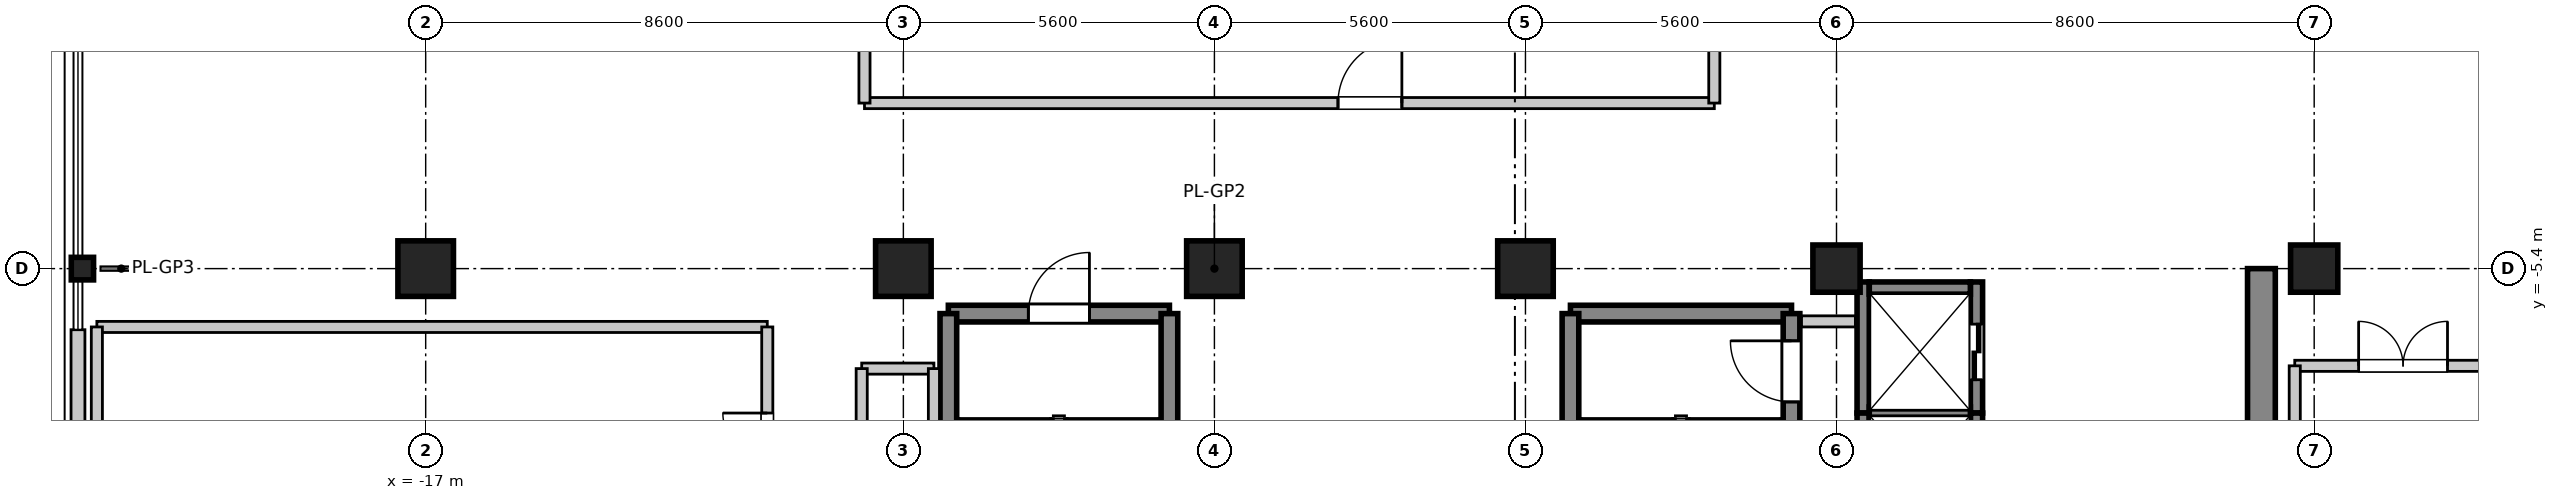
"""IFC4 building model, lengths in metres.
Left out: names, types, materials, properties, quantities, classifications, styles, units other than length and angle.
Written with IfcOpenShell. Run it as: python <this file> out.ifc"""

import sys

from ifc_helpers import new_model, si_unit, direction, frame, frame_2d, origin, origin_2d, place, context, subcontext, project, spatial, rectangle, i_section, extrude, source, transform, mapped, element, fill, save


model = new_model("IFC4")
c1 = context("Model", 3, precision=1e-05, world=origin(), true_north=direction((0.0, 1.0)))
c2 = subcontext(c1, "Body", "Model", "MODEL_VIEW")
j1 = project(units=[si_unit("LENGTHUNIT", "METRE"), si_unit("PLANEANGLEUNIT", "RADIAN")], contexts=[c1])
p1 = place(None, origin())
s1 = spatial("IfcSite", under=j1, at=p1, CompositionType="ELEMENT")
p2 = place(p1, origin())
s2 = spatial("IfcBuilding", under=s1, at=p2, CompositionType="ELEMENT")
p3 = place(p2, frame((0.0, 0.0, 261.5)))
s3 = spatial("IfcBuildingStorey", under=s2, at=p3, CompositionType="ELEMENT", Elevation=261.5)
m1 = source(origin(), c2, "Body", "SweptSolid", [
    extrude(rectangle(XDim=1.0, YDim=1.0, at=origin_2d()), origin(), (0.0, 0.0, 1.0), 4.755),
])
for number, where, z_axis, x_axis in (
    (1, (-17.0, -5.4, 0.0), (0.0, 0.0, 1.0), (1.0, 0.0, 0.0)),
    (2, (-8.4, -5.4, 0.0), (0.0, 0.0, 1.0), (1.0, 0.0, 0.0)),
    (3, (-2.8, -5.4, 0.0), (0.0, 0.0, 1.0), (1.0, 0.0, 0.0)),
    (4, (2.8, -5.4, 0.0), (0.0, 0.0, 1.0), (1.0, 0.0, 0.0)),
):
    element("IfcColumn", number, at=place(p3, frame(where, z_axis=z_axis, x_axis=x_axis)), inside=s3, PredefinedType="COLUMN", context=c2, shape_type="MappedRepresentation", body=[
        mapped(m1, transform((0.0, 0.0, 0.0), scale=1.0)),
    ])
m2 = source(origin(), c2, "Body", "SweptSolid", [
    extrude(rectangle(XDim=0.85, YDim=0.85, at=origin_2d()), origin(), (0.0, 0.0, 1.0), 4.755),
])
for number, where, z_axis, x_axis in (
    (5, (8.4, -5.4, 0.0), (0.0, 0.0, 1.0), (1.0, 0.0, 0.0)),
    (6, (17.0, -5.4, 0.0), (0.0, 0.0, 1.0), (1.0, 0.0, 0.0)),
):
    element("IfcColumn", number, at=place(p3, frame(where, z_axis=z_axis, x_axis=x_axis)), inside=s3, PredefinedType="PILASTER", context=c2, shape_type="MappedRepresentation", body=[
        mapped(m2, transform((0.0, 0.0, 0.0), scale=1.0)),
    ])
m3 = source(origin(), c2, "Body", "SweptSolid", [
    extrude(i_section(OverallWidth=0.401, OverallDepth=0.406, WebThickness=0.016, FlangeThickness=0.025, at=origin_2d()), origin(), (0.0, 0.0, 1.0), 4.707),
])
p4 = place(p3, frame((-23.18, -5.4, 0.0), z_axis=(0.148692963872, 0.0, 0.988883411983), x_axis=(0.0, 1.0, 0.0)))
e7 = element("IfcColumn", 7, at=p4, inside=s3, PredefinedType="COLUMN", context=c2, shape_type="MappedRepresentation", body=[
    mapped(m3, transform((0.0, 0.0, 0.0), scale=1.0)),
])
m4 = source(origin(), c2, "Body", "SweptSolid", [
    extrude(rectangle(XDim=11.6, YDim=0.5, at=frame_2d((5.8, 0.0))), origin(), (0.0, 0.0, 1.0), 4.5),
])
p5 = place(p3, frame((16.05, -17.0, 0.0), z_axis=(0.0, 0.0, 1.0), x_axis=(0.0, 1.0, 0.0)))
e8 = element("IfcWall", 8, at=p5, inside=s3, PredefinedType="SHEAR", context=c2, shape_type="MappedRepresentation", body=[
    mapped(m4, transform((0.0, 0.0, 0.0), scale=1.0)),
])
m5 = source(origin(), c2, "Body", "SweptSolid", [
    extrude(rectangle(XDim=3.98, YDim=0.3, at=frame_2d((1.99, 0.0))), origin(), (0.0, 0.0, 1.0), 4.5),
])
p6 = place(p3, frame((3.61, -6.21, 0.0), z_axis=(0.0, 0.0, 1.0), x_axis=(1.0, 0.0, 0.0)))
e9 = element("IfcWall", 9, at=p6, inside=s3, PredefinedType="SHEAR", context=c2, shape_type="MappedRepresentation", body=[
    mapped(m5, transform((0.0, 0.0, 0.0), scale=1.0)),
])
m6 = source(origin(), c2, "Body", "SweptSolid", [
    extrude(rectangle(XDim=9.38, YDim=0.3, at=frame_2d((4.69, 0.0))), origin(), (0.0, 0.0, 1.0), 4.5),
])
p7 = place(p3, frame((3.61, -15.59, 0.0), z_axis=(0.0, 0.0, 1.0), x_axis=(0.0, 1.0, 0.0)))
e10 = element("IfcWall", 10, at=p7, inside=s3, PredefinedType="SHEAR", context=c2, shape_type="MappedRepresentation", body=[
    mapped(m6, transform((0.0, 0.0, 0.0), scale=1.0)),
])
p8 = place(p3, frame((7.59, -15.59, 0.0), z_axis=(0.0, 0.0, 1.0), x_axis=(0.0, 1.0, 0.0)))
e11 = element("IfcWall", 11, at=p8, inside=s3, PredefinedType="SHEAR", context=c2, shape_type="MappedRepresentation", body=[
    mapped(m6, transform((0.0, 0.0, 0.0), scale=1.0)),
])
p9 = place(p8, frame((7.79, 0.0, 0.0)))
e12 = element("IfcOpeningElement", 12, at=p9, cuts=e11, PredefinedType="OPENING", context=c2, shape_type="SweptSolid", body=[
    extrude(rectangle(XDim=1.1, YDim=2.15, at=frame_2d((0.55, 1.075))), frame((0.0, 0.16, 0.0), z_axis=(0.0, -1.0, 0.0), x_axis=(1.0, 0.0, 0.0)), (0.0, 0.0, 1.0), 0.32),
])
p10 = place(p3, frame((-7.59, -6.21, 0.0), z_axis=(0.0, 0.0, 1.0), x_axis=(1.0, 0.0, 0.0)))
e13 = element("IfcWall", 13, at=p10, inside=s3, PredefinedType="SHEAR", context=c2, shape_type="MappedRepresentation", body=[
    mapped(m5, transform((0.0, 0.0, 0.0), scale=1.0)),
])
p11 = place(p10, frame((1.44, 0.0, 0.0)))
e14 = element("IfcOpeningElement", 14, at=p11, cuts=e13, PredefinedType="OPENING", context=c2, shape_type="SweptSolid", body=[
    extrude(rectangle(XDim=1.1, YDim=2.15, at=frame_2d((0.55, 1.075))), frame((0.0, 0.16, 0.0), z_axis=(0.0, -1.0, 0.0), x_axis=(1.0, 0.0, 0.0)), (0.0, 0.0, 1.0), 0.32),
])
for number, where, z_axis, x_axis in (
    (15, (-7.59, -15.59, 0.0), (0.0, 0.0, 1.0), (0.0, 1.0, 0.0)),
    (16, (-3.61, -15.59, 0.0), (0.0, 0.0, 1.0), (0.0, 1.0, 0.0)),
):
    element("IfcWall", number, at=place(p3, frame(where, z_axis=z_axis, x_axis=x_axis)), inside=s3, PredefinedType="SHEAR", context=c2, shape_type="MappedRepresentation", body=[
        mapped(m6, transform((0.0, 0.0, 0.0), scale=1.0)),
    ])
m7 = source(origin(), c2, "Body", "SweptSolid", [
    extrude(rectangle(XDim=2.36, YDim=0.22, at=frame_2d((1.18, 0.0))), origin(), (0.0, 0.0, 1.0), 4.5),
])
p12 = place(p3, frame((8.88, -8.0, 0.0), z_axis=(0.0, 0.0, 1.0), x_axis=(0.0, 1.0, 0.0)))
e17 = element("IfcWall", 17, at=p12, inside=s3, PredefinedType="SHEAR", context=c2, shape_type="MappedRepresentation", body=[
    mapped(m7, transform((0.0, 0.0, 0.0), scale=1.0)),
])
p13 = place(p3, frame((10.92, -8.0, 0.0), z_axis=(0.0, 0.0, 1.0), x_axis=(0.0, 1.0, 0.0)))
e18 = element("IfcWall", 18, at=p13, inside=s3, PredefinedType="SHEAR", context=c2, shape_type="MappedRepresentation", body=[
    mapped(m7, transform((0.0, 0.0, 0.0), scale=1.0)),
])
p14 = place(p13, frame((0.6, 0.0, 0.0)))
e19 = element("IfcOpeningElement", 19, at=p14, cuts=e18, PredefinedType="OPENING", context=c2, shape_type="SweptSolid", body=[
    extrude(rectangle(XDim=1.0, YDim=2.2, at=frame_2d((0.5, 1.1))), frame((0.0, 0.12, 0.0), z_axis=(0.0, -1.0, 0.0), x_axis=(1.0, 0.0, 0.0)), (0.0, 0.0, 1.0), 0.24),
])
m8 = source(origin(), c2, "Body", "SweptSolid", [
    extrude(rectangle(XDim=1.82, YDim=0.22, at=frame_2d((0.91, 0.0))), origin(), (0.0, 0.0, 1.0), 4.5),
])
p15 = place(p3, frame((8.99, -5.75, 0.0), z_axis=(0.0, 0.0, 1.0), x_axis=(1.0, 0.0, 0.0)))
e20 = element("IfcWall", 20, at=p15, inside=s3, PredefinedType="SHEAR", context=c2, shape_type="MappedRepresentation", body=[
    mapped(m8, transform((0.0, 0.0, 0.0), scale=1.0)),
])
m9 = source(origin(), c2, "Body", "SweptSolid", [
    extrude(rectangle(XDim=2.2, YDim=0.22, at=frame_2d((1.1, 0.0))), origin(), (0.0, 0.0, 1.0), 4.5),
])
p16 = place(p3, frame((8.88, -10.2, 0.0), z_axis=(0.0, 0.0, 1.0), x_axis=(0.0, 1.0, 0.0)))
e21 = element("IfcWall", 21, at=p16, inside=s3, PredefinedType="SHEAR", context=c2, shape_type="MappedRepresentation", body=[
    mapped(m9, transform((0.0, 0.0, 0.0), scale=1.0)),
])
p17 = place(p3, frame((10.92, -10.2, 0.0), z_axis=(0.0, 0.0, 1.0), x_axis=(0.0, 1.0, 0.0)))
e22 = element("IfcWall", 22, at=p17, inside=s3, PredefinedType="SHEAR", context=c2, shape_type="MappedRepresentation", body=[
    mapped(m9, transform((0.0, 0.0, 0.0), scale=1.0)),
])
p18 = place(p17, frame((0.6, 0.0, 0.0)))
e23 = element("IfcOpeningElement", 23, at=p18, cuts=e22, PredefinedType="OPENING", context=c2, shape_type="SweptSolid", body=[
    extrude(rectangle(XDim=1.0, YDim=2.2, at=frame_2d((0.5, 1.1))), frame((0.0, 0.12, 0.0), z_axis=(0.0, -1.0, 0.0), x_axis=(1.0, 0.0, 0.0)), (0.0, 0.0, 1.0), 0.24),
])
m10 = source(origin(), c2, "Body", "SweptSolid", [
    extrude(rectangle(XDim=1.82, YDim=0.22, at=frame_2d((0.91, 0.0))), origin(), (0.0, 0.0, 1.0), 4.8),
])
p19 = place(p3, frame((8.99, -8.0, 0.0), z_axis=(0.0, 0.0, 1.0), x_axis=(1.0, 0.0, 0.0)))
e24 = element("IfcWall", 24, at=p19, inside=s3, PredefinedType="SHEAR", context=c2, shape_type="MappedRepresentation", body=[
    mapped(m10, transform((0.0, 0.0, 0.0), scale=1.0)),
])
m11 = source(origin(), c2, "Body", "SweptSolid", [
    extrude(rectangle(XDim=13.96, YDim=0.25, at=frame_2d((6.98, 0.0))), origin(), (0.0, 0.0, 1.0), 3.98),
])
p20 = place(p3, frame((-23.26, -20.46, 0.0), z_axis=(0.0, 0.0, 1.0), x_axis=(0.0, 1.0, 0.0)))
e25 = element("IfcWall", 25, at=p20, inside=s3, PredefinedType="STANDARD", context=c2, shape_type="MappedRepresentation", body=[
    mapped(m11, transform((0.0, 0.0, 0.0), scale=1.0)),
])
m12 = source(origin(), c2, "Body", "SweptSolid", [
    extrude(rectangle(XDim=0.97, YDim=0.2, at=frame_2d((0.485, 0.0))), origin(), (0.0, 0.0, 1.0), 3.4),
])
p21 = place(p3, frame((7.77, -6.35, 0.0), z_axis=(0.0, 0.0, 1.0), x_axis=(1.0, 0.0, 0.0)))
e26 = element("IfcWall", 26, at=p21, inside=s3, PredefinedType="PARTITIONING", context=c2, shape_type="MappedRepresentation", body=[
    mapped(m12, transform((0.0, 0.0, 0.0), scale=1.0)),
])
m13 = source(origin(), c2, "Body", "SweptSolid", [
    extrude(rectangle(XDim=15.3, YDim=0.2, at=frame_2d((7.65, 0.0))), origin(), (0.0, 0.0, 1.0), 3.4),
])
p22 = place(p3, frame((-9.1, -2.42, 0.0), z_axis=(0.0, 0.0, 1.0), x_axis=(1.0, 0.0, 0.0)))
e27 = element("IfcWall", 27, at=p22, inside=s3, PredefinedType="PARTITIONING", context=c2, shape_type="MappedRepresentation", body=[
    mapped(m13, transform((0.0, 0.0, 0.0), scale=1.0)),
])
p23 = place(p22, frame((8.525, 0.0, 0.0)))
e28 = element("IfcOpeningElement", 28, at=p23, cuts=e27, PredefinedType="OPENING", context=c2, shape_type="SweptSolid", body=[
    extrude(rectangle(XDim=1.15, YDim=2.15, at=frame_2d((0.575, 1.075))), frame((0.0, 0.11, 0.0), z_axis=(0.0, -1.0, 0.0), x_axis=(1.0, 0.0, 0.0)), (0.0, 0.0, 1.0), 0.22),
])
m14 = source(origin(), c2, "Body", "SweptSolid", [
    extrude(rectangle(XDim=4.84, YDim=0.2, at=frame_2d((2.42, 0.0))), origin(), (0.0, 0.0, 1.0), 3.4),
])
for number, where, z_axis, x_axis in (
    (29, (-9.1, -2.42, 0.0), (0.0, 0.0, 1.0), (0.0, 1.0, 0.0)),
    (30, (6.2, -2.42, 0.0), (0.0, 0.0, 1.0), (0.0, 1.0, 0.0)),
):
    element("IfcWall", number, at=place(p3, frame(where, z_axis=z_axis, x_axis=x_axis)), inside=s3, PredefinedType="PARTITIONING", context=c2, shape_type="MappedRepresentation", body=[
        mapped(m14, transform((0.0, 0.0, 0.0), scale=1.0)),
    ])
m15 = source(origin(), c2, "Body", "SweptSolid", [
    extrude(rectangle(XDim=1.3, YDim=0.2, at=frame_2d((0.65, 0.0))), origin(), (0.0, 0.0, 1.0), 3.4),
])
p24 = place(p3, frame((-9.15, -7.2, 0.0), z_axis=(0.0, 0.0, 1.0), x_axis=(1.0, 0.0, 0.0)))
e31 = element("IfcWall", 31, at=p24, inside=s3, PredefinedType="PARTITIONING", context=c2, shape_type="MappedRepresentation", body=[
    mapped(m15, transform((0.0, 0.0, 0.0), scale=1.0)),
])
m16 = source(origin(), c2, "Body", "SweptSolid", [
    extrude(rectangle(XDim=8.85, YDim=0.2, at=frame_2d((4.425, 0.0))), origin(), (0.0, 0.0, 1.0), 3.4),
])
p25 = place(p3, frame((-9.15, -16.05, 0.0), z_axis=(0.0, 0.0, 1.0), x_axis=(0.0, 1.0, 0.0)))
e32 = element("IfcWall", 32, at=p25, inside=s3, PredefinedType="PARTITIONING", context=c2, shape_type="MappedRepresentation", body=[
    mapped(m16, transform((0.0, 0.0, 0.0), scale=1.0)),
])
p26 = place(p25, frame((3.975, 0.0, 0.0)))
e33 = element("IfcOpeningElement", 33, at=p26, cuts=e32, PredefinedType="OPENING", context=c2, shape_type="SweptSolid", body=[
    extrude(rectangle(XDim=1.15, YDim=2.15, at=frame_2d((0.575, 1.075))), frame((0.0, 0.11, 0.0), z_axis=(0.0, -1.0, 0.0), x_axis=(1.0, 0.0, 0.0)), (0.0, 0.0, 1.0), 0.22),
])
p27 = place(p3, frame((-7.85, -16.05, 0.0), z_axis=(0.0, 0.0, 1.0), x_axis=(0.0, 1.0, 0.0)))
e34 = element("IfcWall", 34, at=p27, inside=s3, PredefinedType="PARTITIONING", context=c2, shape_type="MappedRepresentation", body=[
    mapped(m16, transform((0.0, 0.0, 0.0), scale=1.0)),
])
m17 = source(origin(), c2, "Body", "SweptSolid", [
    extrude(rectangle(XDim=12.07, YDim=0.2, at=frame_2d((6.035, 0.0))), origin(), (0.0, 0.0, 1.0), 3.4),
])
p28 = place(p3, frame((-22.92, -6.45, 0.0), z_axis=(0.0, 0.0, 1.0), x_axis=(1.0, 0.0, 0.0)))
e35 = element("IfcWall", 35, at=p28, inside=s3, PredefinedType="PARTITIONING", context=c2, shape_type="MappedRepresentation", body=[
    mapped(m17, transform((0.0, 0.0, 0.0), scale=1.0)),
])
m18 = source(origin(), c2, "Body", "SweptSolid", [
    extrude(rectangle(XDim=4.75, YDim=0.2, at=frame_2d((2.375, 0.0))), origin(), (0.0, 0.0, 1.0), 3.4),
])
p29 = place(p3, frame((-22.92, -11.2, 0.0), z_axis=(0.0, 0.0, 1.0), x_axis=(0.0, 1.0, 0.0)))
e36 = element("IfcWall", 36, at=p29, inside=s3, PredefinedType="PARTITIONING", context=c2, shape_type="MappedRepresentation", body=[
    mapped(m18, transform((0.0, 0.0, 0.0), scale=1.0)),
])
p30 = place(p3, frame((-10.85, -11.2, 0.0), z_axis=(0.0, 0.0, 1.0), x_axis=(0.0, 1.0, 0.0)))
e37 = element("IfcWall", 37, at=p30, inside=s3, PredefinedType="PARTITIONING", context=c2, shape_type="MappedRepresentation", body=[
    mapped(m18, transform((0.0, 0.0, 0.0), scale=1.0)),
])
p31 = place(p30, frame((1.6, 0.0, 0.0)))
e38 = element("IfcOpeningElement", 38, at=p31, cuts=e37, PredefinedType="OPENING", context=c2, shape_type="SweptSolid", body=[
    extrude(rectangle(XDim=1.6, YDim=2.15, at=frame_2d((0.8, 1.075))), frame((0.0, 0.11, 0.0), z_axis=(0.0, -1.0, 0.0), x_axis=(1.0, 0.0, 0.0)), (0.0, 0.0, 1.0), 0.22),
])
m19 = source(origin(), c2, "Body", "SweptSolid", [
    extrude(rectangle(XDim=6.27, YDim=0.2, at=frame_2d((3.135, 0.0))), origin(), (0.0, 0.0, 1.0), 3.4),
])
p32 = place(p3, frame((16.65, -7.15, 0.0), z_axis=(0.0, 0.0, 1.0), x_axis=(1.0, 0.0, 0.0)))
e39 = element("IfcWall", 39, at=p32, inside=s3, PredefinedType="PARTITIONING", context=c2, shape_type="MappedRepresentation", body=[
    mapped(m19, transform((0.0, 0.0, 0.0), scale=1.0)),
])
p33 = place(p32, frame((1.15, 0.0, 0.0)))
e40 = element("IfcOpeningElement", 40, at=p33, cuts=e39, PredefinedType="OPENING", context=c2, shape_type="SweptSolid", body=[
    extrude(rectangle(XDim=1.6, YDim=2.15, at=frame_2d((0.8, 1.075))), frame((0.0, 0.11, 0.0), z_axis=(0.0, -1.0, 0.0), x_axis=(1.0, 0.0, 0.0)), (0.0, 0.0, 1.0), 0.22),
])
m20 = source(origin(), c2, "Body", "SweptSolid", [
    extrude(rectangle(XDim=8.9, YDim=0.2, at=frame_2d((4.45, 0.0))), origin(), (0.0, 0.0, 1.0), 3.4),
])
p34 = place(p3, frame((16.65, -16.05, 0.0), z_axis=(0.0, 0.0, 1.0), x_axis=(0.0, 1.0, 0.0)))
e41 = element("IfcWall", 41, at=p34, inside=s3, PredefinedType="PARTITIONING", context=c2, shape_type="MappedRepresentation", body=[
    mapped(m20, transform((0.0, 0.0, 0.0), scale=1.0)),
])
m21 = source(origin(), c2, "Body", "SweptSolid", [
    extrude(rectangle(XDim=1.1, YDim=2.15, at=frame_2d((0.55, 1.075))), frame((0.0, 0.025, 0.0), z_axis=(0.0, -1.0, 0.0), x_axis=(1.0, 0.0, 0.0)), (0.0, 0.0, 1.0), 0.05),
])
p35 = place(p9, origin())
e42 = element("IfcDoor", 42, at=p35, inside=s3, OperationType="SINGLE_SWING_RIGHT", PredefinedType="DOOR", context=c2, shape_type="MappedRepresentation", body=[
    mapped(m21, transform((0.0, 0.0, 0.0), scale=1.0)),
])
fill(e12, e42)
p36 = place(p11, frame((1.1, 0.0, 0.0), z_axis=(0.0, 0.0, 1.0), x_axis=(-1.0, 0.0, 0.0)))
e43 = element("IfcDoor", 43, at=p36, inside=s3, OperationType="SINGLE_SWING_RIGHT", PredefinedType="DOOR", context=c2, shape_type="MappedRepresentation", body=[
    mapped(m21, transform((0.0, 0.0, 0.0), scale=1.0)),
])
fill(e14, e43)
m22 = source(origin(), c2, "Body", "SweptSolid", [
    extrude(rectangle(XDim=1.0, YDim=2.2, at=frame_2d((0.5, 1.1))), frame((0.0, 0.025, 0.0), z_axis=(0.0, -1.0, 0.0), x_axis=(1.0, 0.0, 0.0)), (0.0, 0.0, 1.0), 0.05),
])
p37 = place(p14, frame((1.0, 0.0, 0.0), z_axis=(0.0, 0.0, 1.0), x_axis=(-1.0, 0.0, 0.0)))
e44 = element("IfcDoor", 44, at=p37, inside=s3, OperationType="DOUBLE_DOOR_SLIDING", PredefinedType="DOOR", context=c2, shape_type="MappedRepresentation", body=[
    mapped(m22, transform((0.0, 0.0, 0.0), scale=1.0)),
])
fill(e19, e44)
m23 = source(origin(), c2, "Body", "SweptSolid", [
    extrude(rectangle(XDim=1.15, YDim=2.15, at=frame_2d((0.575, 1.075))), frame((0.0, 0.025, 0.0), z_axis=(0.0, -1.0, 0.0), x_axis=(1.0, 0.0, 0.0)), (0.0, 0.0, 1.0), 0.05),
])
p38 = place(p23, origin())
e45 = element("IfcDoor", 45, at=p38, inside=s3, OperationType="SINGLE_SWING_RIGHT", PredefinedType="DOOR", context=c2, shape_type="MappedRepresentation", body=[
    mapped(m23, transform((0.0, 0.0, 0.0), scale=1.0)),
])
fill(e28, e45)
m24 = source(origin(), c2, "Body", "SweptSolid", [
    extrude(rectangle(XDim=1.6, YDim=2.15, at=frame_2d((0.8, 1.075))), frame((0.0, 0.025, 0.0), z_axis=(0.0, -1.0, 0.0), x_axis=(1.0, 0.0, 0.0)), (0.0, 0.0, 1.0), 0.05),
])
p39 = place(p31, origin())
e46 = element("IfcDoor", 46, at=p39, inside=s3, OperationType="DOUBLE_DOOR_SINGLE_SWING", PredefinedType="DOOR", context=c2, shape_type="MappedRepresentation", body=[
    mapped(m24, transform((0.0, 0.0, 0.0), scale=1.0)),
])
fill(e38, e46)
p40 = place(p33, frame((1.6, 0.0, 0.0), z_axis=(0.0, 0.0, 1.0), x_axis=(-1.0, 0.0, 0.0)))
e47 = element("IfcDoor", 47, at=p40, inside=s3, OperationType="DOUBLE_DOOR_SINGLE_SWING", PredefinedType="DOOR", context=c2, shape_type="MappedRepresentation", body=[
    mapped(m24, transform((0.0, 0.0, 0.0), scale=1.0)),
])
fill(e40, e47)
save(model, sys.argv[1])
